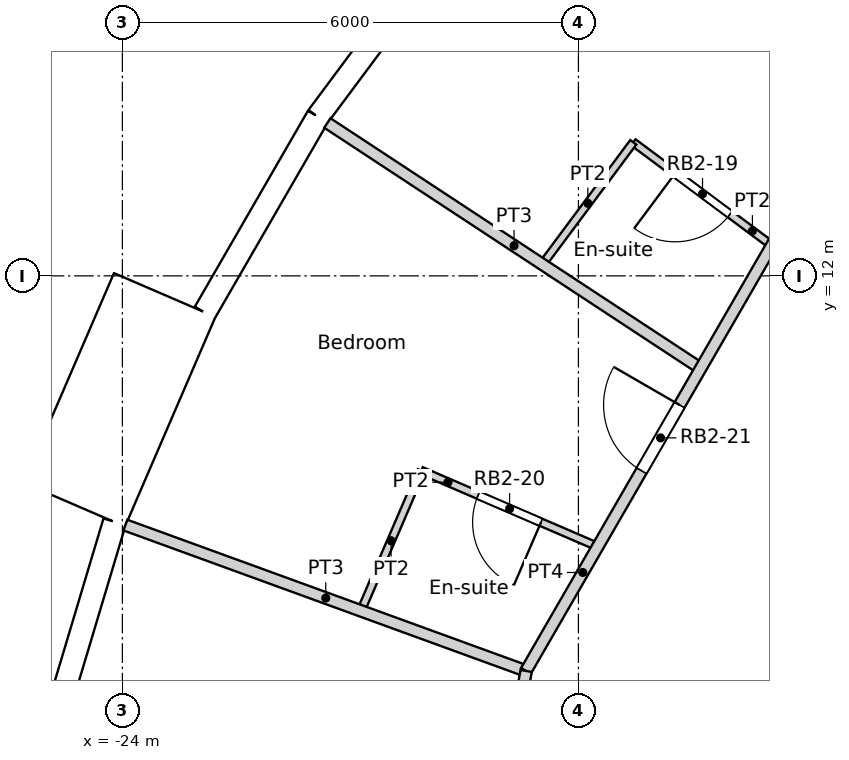
"""IFC4 building model, lengths in metres.
Left out: names, types, materials, properties, quantities, classifications, styles, units other than length and angle.
Written with IfcOpenShell. Run it as: python <this file> out.ifc"""

import sys

from ifc_helpers import new_model, si_unit, direction, frame, frame_2d, origin, origin_2d, place, context, subcontext, project, spatial, rectangle, circle, extrude, element, fill, save


model = new_model("IFC4")
c1 = context("Model", 3, precision=1e-05, world=origin(), true_north=direction((0.0, 1.0)))
c2 = subcontext(c1, "Body", "Model", "MODEL_VIEW")
j1 = project(units=[si_unit("LENGTHUNIT", "METRE"), si_unit("PLANEANGLEUNIT", "RADIAN")], contexts=[c1])
p1 = place(None, origin())
s1 = spatial("IfcSite", under=j1, at=p1, CompositionType="ELEMENT")
p2 = place(p1, origin())
s2 = spatial("IfcBuilding", under=s1, at=p2, CompositionType="ELEMENT")
p3 = place(p2, frame((0.0, 0.0, 136.8)))
s3 = spatial("IfcBuildingStorey", under=s2, at=p3, CompositionType="ELEMENT", Elevation=136.8)
for number, where, z_axis, x_axis in (
    (1, (-20.509, 13.489, 0.0), (0.0, 0.0, 1.0), (1.0, 0.0, 0.0)),
    (2, (-23.067, 8.396, 0.0), (0.0, 0.0, 1.0), (1.0, 0.0, 0.0)),
):
    element("IfcColumn", number, at=place(p3, frame(where, z_axis=z_axis, x_axis=x_axis)), inside=s3, PredefinedType="COLUMN", context=c2, shape_type="SweptSolid", body=[
        extrude(circle(Radius=0.6, at=origin_2d()), origin(), (0.0, 0.0, 1.0), 3.6),
    ])
p4 = place(p3, frame((-16.958, 8.167, 0.0), z_axis=(0.0, 0.0, 1.0), x_axis=(1.0, 0.0, 0.0)))
e3 = element("IfcColumn", 3, at=p4, inside=s3, PredefinedType="COLUMN", context=c2, shape_type="SweptSolid", body=[
    extrude(circle(Radius=0.65, at=origin_2d()), origin(), (0.0, 0.0, 1.0), 3.6),
])
p5 = place(p3, frame((-19.653, 16.478, 0.0), z_axis=(0.0, 0.0, 1.0), x_axis=(-0.597197580538, -0.80209416517, 0.0)))
e4 = element("IfcWall", 4, at=p5, inside=s3, PredefinedType="SOLIDWALL", context=c2, shape_type="SweptSolid", body=[
    extrude(rectangle(XDim=2.973, YDim=0.3, at=frame_2d((1.486, 0.0))), origin(), (0.0, 0.0, 1.0), 2.8),
])
p6 = place(p5, frame((1.486, 0.0, 1.55)))
e5 = element("IfcOpeningElement", 5, at=p6, cuts=e4, PredefinedType="OPENING", context=c2, shape_type="SweptSolid", body=[
    extrude(circle(Radius=0.9, at=origin_2d()), frame((0.0, 0.16, 0.0), z_axis=(0.0, -1.0, 0.0), x_axis=(1.0, 0.0, 0.0)), (0.0, 0.0, 1.0), 0.32),
])
p7 = place(p3, frame((-21.428, 14.094, 0.0), z_axis=(0.0, 0.0, 1.0), x_axis=(-0.499954672104, -0.866051572276, 0.0)))
e6 = element("IfcWall", 6, at=p7, inside=s3, PredefinedType="SOLIDWALL", context=c2, shape_type="SweptSolid", body=[
    extrude(rectangle(XDim=2.973, YDim=0.3, at=frame_2d((1.486, 0.0))), origin(), (0.0, 0.0, 1.0), 3.3),
])
p8 = place(p7, frame((1.486, 0.0, 1.55)))
e7 = element("IfcOpeningElement", 7, at=p8, cuts=e6, PredefinedType="OPENING", context=c2, shape_type="SweptSolid", body=[
    extrude(circle(Radius=0.9, at=origin_2d()), frame((0.0, 0.16, 0.0), z_axis=(0.0, -1.0, 0.0), x_axis=(1.0, 0.0, 0.0)), (0.0, 0.0, 1.0), 0.32),
])
p9 = place(p3, frame((-23.444, 11.746, -0.3), z_axis=(0.0, 0.0, 1.0), x_axis=(-0.396079003245, -0.918216435917, 0.0)))
e8 = element("IfcWall", 8, at=p9, inside=s3, PredefinedType="ELEMENTEDWALL", context=c2, shape_type="SweptSolid", body=[
    extrude(rectangle(XDim=3.0, YDim=1.45, at=frame_2d((1.5, 0.0))), origin(), (0.0, 0.0, 1.0), 3.6),
])
p10 = place(p9, frame((1.5, 0.0, 1.85)))
e9 = element("IfcOpeningElement", 9, at=p10, cuts=e8, PredefinedType="OPENING", context=c2, shape_type="SweptSolid", body=[
    extrude(circle(Radius=0.9, at=origin_2d()), frame((0.0, 0.735, 0.0), z_axis=(0.0, -1.0, 0.0), x_axis=(1.0, 0.0, 0.0)), (0.0, 0.0, 1.0), 1.47),
])
p11 = place(p3, frame((-24.104, 8.763, 0.0), z_axis=(0.0, 0.0, 1.0), x_axis=(-0.286782750849, -0.957995643944, 0.0)))
e10 = element("IfcWall", 10, at=p11, inside=s3, PredefinedType="SOLIDWALL", context=c2, shape_type="SweptSolid", body=[
    extrude(rectangle(XDim=2.973, YDim=0.3, at=frame_2d((1.486, 0.0))), origin(), (0.0, 0.0, 1.0), 2.8),
])
p12 = place(p11, frame((1.486, 0.0, 1.55)))
e11 = element("IfcOpeningElement", 11, at=p12, cuts=e10, PredefinedType="OPENING", context=c2, shape_type="SweptSolid", body=[
    extrude(circle(Radius=0.9, at=origin_2d()), frame((0.0, 0.16, 0.0), z_axis=(0.0, -1.0, 0.0), x_axis=(1.0, 0.0, 0.0)), (0.0, 0.0, 1.0), 0.32),
])
p13 = place(p3, frame((-18.69, 6.803, 0.0), z_axis=(0.0, 0.0, 1.0), x_axis=(0.500229307554, 0.865892972523, 0.0)))
e12 = element("IfcWall", 12, at=p13, inside=s3, PredefinedType="PARTITIONING", context=c2, shape_type="SweptSolid", body=[
    extrude(rectangle(XDim=6.907, YDim=0.15, at=frame_2d((3.454, 0.0))), origin(), (0.0, 0.0, 1.0), 3.3),
])
p14 = place(p13, frame((3.04, 0.0, 0.0)))
e13 = element("IfcOpeningElement", 13, at=p14, cuts=e12, PredefinedType="OPENING", context=c2, shape_type="SweptSolid", body=[
    extrude(rectangle(XDim=1.0, YDim=2.1, at=frame_2d((0.5, 1.05))), frame((0.0, 0.075, 0.0), z_axis=(0.0, -1.0, 0.0), x_axis=(1.0, 0.0, 0.0)), (0.0, 0.0, 1.0), 0.15),
])
p15 = place(p3, frame((-19.888, 0.0, 0.0), z_axis=(0.0, 0.0, 1.0), x_axis=(0.173763153374, 0.984787472772, 0.0)))
e14 = element("IfcWall", 14, at=p15, inside=s3, PredefinedType="PARTITIONING", context=c2, shape_type="SweptSolid", body=[
    extrude(rectangle(XDim=6.907, YDim=0.15, at=frame_2d((3.454, 0.0))), origin(), (0.0, 0.0, 1.0), 3.3),
])
p16 = place(p15, frame((5.037, 0.0, 0.0)))
e15 = element("IfcOpeningElement", 15, at=p16, cuts=e14, PredefinedType="OPENING", context=c2, shape_type="SweptSolid", body=[
    extrude(rectangle(XDim=1.0, YDim=2.1, at=frame_2d((0.5, 1.05))), frame((0.0, 0.075, 0.0), z_axis=(0.0, -1.0, 0.0), x_axis=(1.0, 0.0, 0.0)), (0.0, 0.0, 1.0), 0.15),
])
p17 = place(p15, frame((0.659, 0.0, 0.0)))
e16 = element("IfcOpeningElement", 16, at=p17, cuts=e14, PredefinedType="OPENING", context=c2, shape_type="SweptSolid", body=[
    extrude(rectangle(XDim=1.0, YDim=2.1, at=frame_2d((0.5, 1.05))), frame((0.0, 0.075, 0.0), z_axis=(0.0, -1.0, 0.0), x_axis=(1.0, 0.0, 0.0)), (0.0, 0.0, 1.0), 0.15),
])
p18 = place(p3, frame((-17.497, 18.546, 0.0), z_axis=(0.0, 0.0, 1.0), x_axis=(0.68628608304, -0.72733170715, 0.0)))
e17 = element("IfcWall", 17, at=p18, inside=s3, PredefinedType="PARTITIONING", context=c2, shape_type="SweptSolid", body=[
    extrude(rectangle(XDim=6.013, YDim=0.1, at=frame_2d((3.007, 0.0))), origin(), (0.0, 0.0, 1.0), 3.3),
])
p19 = place(p18, frame((2.321, 0.0, 0.0)))
e18 = element("IfcOpeningElement", 18, at=p19, cuts=e17, PredefinedType="OPENING", context=c2, shape_type="SweptSolid", body=[
    extrude(rectangle(XDim=0.9, YDim=2.1, at=frame_2d((0.45, 1.05))), frame((0.0, 0.05, 0.0), z_axis=(0.0, -1.0, 0.0), x_axis=(1.0, 0.0, 0.0)), (0.0, 0.0, 1.0), 0.1),
])
p20 = place(p3, frame((-17.278, 13.757, 0.0), z_axis=(0.0, 0.0, 1.0), x_axis=(0.802174554185, -0.597089595135, 0.0)))
e19 = element("IfcWall", 19, at=p20, inside=s3, PredefinedType="PARTITIONING", context=c2, shape_type="SweptSolid", body=[
    extrude(rectangle(XDim=2.271, YDim=0.1, at=frame_2d((1.136, 0.0))), origin(), (0.0, 0.0, 1.0), 3.3),
])
p21 = place(p20, frame((0.685, 0.0, 0.0)))
e20 = element("IfcOpeningElement", 20, at=p21, cuts=e19, PredefinedType="OPENING", context=c2, shape_type="SweptSolid", body=[
    extrude(rectangle(XDim=0.9, YDim=2.04, at=frame_2d((0.45, 1.02))), frame((0.0, 0.05, 0.0), z_axis=(0.0, -1.0, 0.0), x_axis=(1.0, 0.0, 0.0)), (0.0, 0.0, 1.0), 0.1),
])
p22 = place(p3, frame((-18.474, 12.151, 0.0), z_axis=(0.0, 0.0, 1.0), x_axis=(0.597246123016, 0.802058020683, 0.0)))
e21 = element("IfcWall", 21, at=p22, inside=s3, PredefinedType="PARTITIONING", context=c2, shape_type="SweptSolid", body=[
    extrude(rectangle(XDim=2.003, YDim=0.1, at=frame_2d((1.001, 0.0))), origin(), (0.0, 0.0, 1.0), 3.3),
])
p23 = place(p3, frame((-21.303, 14.011, 0.0), z_axis=(0.0, 0.0, 1.0), x_axis=(0.835566588395, -0.549389184785, 0.0)))
e22 = element("IfcWall", 22, at=p23, inside=s3, PredefinedType="PARTITIONING", context=c2, shape_type="SweptSolid", body=[
    extrude(rectangle(XDim=5.879, YDim=0.15, at=frame_2d((2.939, 0.0))), origin(), (0.0, 0.0, 1.0), 3.3),
])
p24 = place(p3, frame((-20.067, 9.437, 0.0), z_axis=(0.0, 0.0, 1.0), x_axis=(0.918293825202, -0.395899546091, 0.0)))
e23 = element("IfcWall", 23, at=p24, inside=s3, PredefinedType="PARTITIONING", context=c2, shape_type="SweptSolid", body=[
    extrude(rectangle(XDim=2.528, YDim=0.1, at=frame_2d((1.264, 0.0))), origin(), (0.0, 0.0, 1.0), 3.3),
])
p25 = place(p24, frame((0.815, 0.0, 0.0)))
e24 = element("IfcOpeningElement", 24, at=p25, cuts=e23, PredefinedType="OPENING", context=c2, shape_type="SweptSolid", body=[
    extrude(rectangle(XDim=0.9, YDim=2.04, at=frame_2d((0.45, 1.02))), frame((0.0, 0.05, 0.0), z_axis=(0.0, -1.0, 0.0), x_axis=(1.0, 0.0, 0.0)), (0.0, 0.0, 1.0), 0.1),
])
p26 = place(p3, frame((-20.862, 7.593, 0.0), z_axis=(0.0, 0.0, 1.0), x_axis=(0.395972527348, 0.918262357709, 0.0)))
e25 = element("IfcWall", 25, at=p26, inside=s3, PredefinedType="PARTITIONING", context=c2, shape_type="SweptSolid", body=[
    extrude(rectangle(XDim=2.008, YDim=0.1, at=frame_2d((1.004, 0.0))), origin(), (0.0, 0.0, 1.0), 3.3),
])
p27 = place(p3, frame((-23.96, 8.721, 0.0), z_axis=(0.0, 0.0, 1.0), x_axis=(0.939653583607, -0.342127378054, 0.0)))
e26 = element("IfcWall", 26, at=p27, inside=s3, PredefinedType="PARTITIONING", context=c2, shape_type="SweptSolid", body=[
    extrude(rectangle(XDim=5.61, YDim=0.15, at=frame_2d((2.805, 0.0))), origin(), (0.0, 0.0, 1.0), 3.3),
])
p28 = place(p6, origin())
e27 = element("IfcWindow", 27, at=p28, inside=s3, PartitioningType="SINGLE_PANEL", PredefinedType="WINDOW", context=c2, shape_type="SweptSolid", body=[
    extrude(circle(Radius=0.9, at=origin_2d()), frame((0.0, 0.12, 0.0), z_axis=(0.0, -1.0, 0.0), x_axis=(1.0, 0.0, 0.0)), (0.0, 0.0, 1.0), 0.1),
])
fill(e5, e27)
p29 = place(p8, origin())
e28 = element("IfcWindow", 28, at=p29, inside=s3, PartitioningType="SINGLE_PANEL", PredefinedType="WINDOW", context=c2, shape_type="SweptSolid", body=[
    extrude(circle(Radius=0.9, at=origin_2d()), frame((0.0, 0.12, 0.0), z_axis=(0.0, -1.0, 0.0), x_axis=(1.0, 0.0, 0.0)), (0.0, 0.0, 1.0), 0.1),
])
fill(e7, e28)
p30 = place(p10, origin())
e29 = element("IfcWindow", 29, at=p30, inside=s3, PartitioningType="SINGLE_PANEL", PredefinedType="WINDOW", context=c2, shape_type="SweptSolid", body=[
    extrude(circle(Radius=0.9, at=origin_2d()), frame((0.0, 0.695, 0.0), z_axis=(0.0, -1.0, 0.0), x_axis=(1.0, 0.0, 0.0)), (0.0, 0.0, 1.0), 0.1),
])
fill(e9, e29)
p31 = place(p12, origin())
e30 = element("IfcWindow", 30, at=p31, inside=s3, PartitioningType="SINGLE_PANEL", PredefinedType="WINDOW", context=c2, shape_type="SweptSolid", body=[
    extrude(circle(Radius=0.9, at=origin_2d()), frame((0.0, 0.12, 0.0), z_axis=(0.0, -1.0, 0.0), x_axis=(1.0, 0.0, 0.0)), (0.0, 0.0, 1.0), 0.1),
])
fill(e11, e30)
p32 = place(p21, origin())
e31 = element("IfcDoor", 31, at=p32, inside=s3, OperationType="SINGLE_SWING_RIGHT", PredefinedType="DOOR", context=c2, shape_type="SweptSolid", body=[
    extrude(rectangle(XDim=0.9, YDim=2.04, at=frame_2d((0.45, 1.02))), frame((0.0, 0.025, 0.0), z_axis=(0.0, -1.0, 0.0), x_axis=(1.0, 0.0, 0.0)), (0.0, 0.0, 1.0), 0.05),
])
fill(e20, e31)
p33 = place(p25, origin())
e32 = element("IfcDoor", 32, at=p33, inside=s3, OperationType="SINGLE_SWING_LEFT", PredefinedType="DOOR", context=c2, shape_type="SweptSolid", body=[
    extrude(rectangle(XDim=0.9, YDim=2.04, at=frame_2d((0.45, 1.02))), frame((0.0, 0.025, 0.0), z_axis=(0.0, -1.0, 0.0), x_axis=(1.0, 0.0, 0.0)), (0.0, 0.0, 1.0), 0.05),
])
fill(e24, e32)
p34 = place(p14, origin())
e33 = element("IfcDoor", 33, at=p34, inside=s3, OperationType="SINGLE_SWING_RIGHT", PredefinedType="DOOR", context=c2, shape_type="SweptSolid", body=[
    extrude(rectangle(XDim=1.0, YDim=2.1, at=frame_2d((0.5, 1.05))), frame((0.0, 0.025, 0.0), z_axis=(0.0, -1.0, 0.0), x_axis=(1.0, 0.0, 0.0)), (0.0, 0.0, 1.0), 0.05),
])
fill(e13, e33)
save(model, sys.argv[1])
